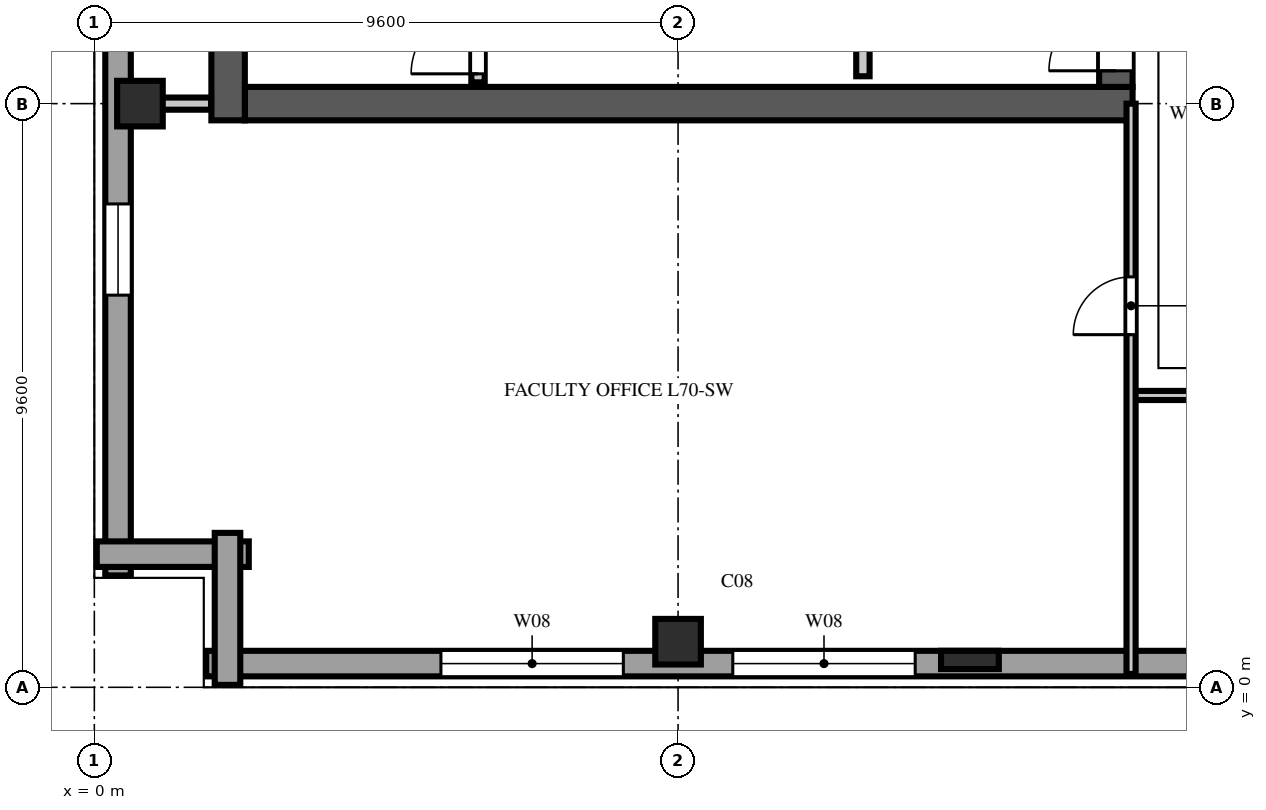
"""IFC4 building model, lengths in metres.
Left out: names, types, materials, properties, quantities, classifications, styles, units other than length and angle.
Written with IfcOpenShell. Run it as: python <this file> out.ifc"""

import sys

from ifc_helpers import new_model, si_unit, direction, frame, frame_2d, origin, origin_2d, place, context, subcontext, project, spatial, rectangle, extrude, element, fill, save


model = new_model("IFC4")
c1 = context("Model", 3, precision=1e-05, world=origin(), true_north=direction((0.0, 1.0)))
c2 = subcontext(c1, "Body", "Model", "MODEL_VIEW")
j1 = project(units=[si_unit("LENGTHUNIT", "METRE"), si_unit("PLANEANGLEUNIT", "RADIAN")], contexts=[c1])
p1 = place(None, origin())
s1 = spatial("IfcSite", under=j1, at=p1, CompositionType="ELEMENT")
p2 = place(p1, origin())
s2 = spatial("IfcBuilding", under=s1, at=p2, CompositionType="ELEMENT")
p3 = place(p2, frame((0.0, 0.0, 277.2)))
s3 = spatial("IfcBuildingStorey", under=s2, at=p3, CompositionType="ELEMENT", Elevation=277.2)
p4 = place(p3, frame((2.475, 9.6, 0.0), z_axis=(0.0, 0.0, 1.0), x_axis=(1.0, 0.0, 0.0)))
e1 = element("IfcWall", 1, at=p4, inside=s3, PredefinedType="SHEAR", context=c2, shape_type="SweptSolid", body=[
    extrude(rectangle(XDim=14.6, YDim=0.55, at=frame_2d((7.3, 0.0))), origin(), (0.0, 0.0, 1.0), 3.54),
])
p5 = place(p3, frame((2.2, 9.325, 0.0), z_axis=(0.0, 0.0, 1.0), x_axis=(0.0, 1.0, 0.0)))
e2 = element("IfcWall", 2, at=p5, inside=s3, PredefinedType="SHEAR", context=c2, shape_type="SweptSolid", body=[
    extrude(rectangle(XDim=38.95, YDim=0.55, at=frame_2d((19.475, 0.0))), origin(), (0.0, 0.0, 1.0), 3.54),
])
p6 = place(p3, frame((16.8, 9.875, 0.0), z_axis=(0.0, 0.0, 1.0), x_axis=(0.0, 1.0, 0.0)))
e3 = element("IfcWall", 3, at=p6, inside=s3, PredefinedType="SHEAR", context=c2, shape_type="SweptSolid", body=[
    extrude(rectangle(XDim=12.525, YDim=0.55, at=frame_2d((6.262, 0.0))), origin(), (0.0, 0.0, 1.0), 3.54),
])
p7 = place(p6, frame((0.265, 0.0, 0.0)))
e4 = element("IfcOpeningElement", 4, at=p7, cuts=e3, PredefinedType="OPENING", context=c2, shape_type="SweptSolid", body=[
    extrude(rectangle(XDim=1.1, YDim=2.2, at=frame_2d((0.55, 1.1))), frame((0.0, 0.287, 0.0), z_axis=(0.0, -1.0, 0.0), x_axis=(1.0, 0.0, 0.0)), (0.0, 0.0, 1.0), 0.574),
])
for number, where, z_axis, x_axis in (
    (5, (0.75, 9.6, 0.0), (0.0, 0.0, 1.0), (1.0, 0.0, 0.0)),
    (6, (9.6, 0.75, 0.0), (0.0, 0.0, 1.0), (1.0, 0.0, 0.0)),
):
    element("IfcColumn", number, at=place(p3, frame(where, z_axis=z_axis, x_axis=x_axis)), inside=s3, PredefinedType="COLUMN", context=c2, shape_type="SweptSolid", body=[
        extrude(rectangle(XDim=0.75, YDim=0.75, at=origin_2d()), origin(), (0.0, 0.0, 1.0), 3.8),
    ])
p8 = place(p3, frame((14.4, 0.45, 0.0), z_axis=(0.0, 0.0, 1.0), x_axis=(1.0, 0.0, 0.0)))
e7 = element("IfcColumn", 7, at=p8, inside=s3, PredefinedType="PILASTER", context=c2, shape_type="SweptSolid", body=[
    extrude(rectangle(XDim=0.95, YDim=0.3, at=origin_2d()), origin(), (0.0, 0.0, 1.0), 3.8),
])
p9 = place(p3, frame((1.84, 0.39, 0.0), z_axis=(0.0, 0.0, 1.0), x_axis=(1.0, 0.0, 0.0)))
e8 = element("IfcWall", 8, at=p9, inside=s3, PredefinedType="SOLIDWALL", context=c2, shape_type="SweptSolid", body=[
    extrude(rectangle(XDim=44.32, YDim=0.42, at=frame_2d((22.16, 0.0))), origin(), (0.0, 0.0, 1.0), 3.54),
])
p10 = place(p9, frame((3.86, 0.0, 0.75)))
e9 = element("IfcOpeningElement", 9, at=p10, cuts=e8, PredefinedType="OPENING", context=c2, shape_type="SweptSolid", body=[
    extrude(rectangle(XDim=3.0, YDim=1.9, at=frame_2d((1.5, 0.95))), frame((0.0, 0.222, 0.0), z_axis=(0.0, -1.0, 0.0), x_axis=(1.0, 0.0, 0.0)), (0.0, 0.0, 1.0), 0.444),
])
p11 = place(p9, frame((8.66, 0.0, 0.75)))
e10 = element("IfcOpeningElement", 10, at=p11, cuts=e8, PredefinedType="OPENING", context=c2, shape_type="SweptSolid", body=[
    extrude(rectangle(XDim=3.0, YDim=1.9, at=frame_2d((1.5, 0.95))), frame((0.0, 0.222, 0.0), z_axis=(0.0, -1.0, 0.0), x_axis=(1.0, 0.0, 0.0)), (0.0, 0.0, 1.0), 0.444),
])
p12 = place(p9, frame((18.26, 0.0, 0.75)))
e11 = element("IfcOpeningElement", 11, at=p12, cuts=e8, PredefinedType="OPENING", context=c2, shape_type="SweptSolid", body=[
    extrude(rectangle(XDim=3.0, YDim=1.9, at=frame_2d((1.5, 0.95))), frame((0.0, 0.222, 0.0), z_axis=(0.0, -1.0, 0.0), x_axis=(1.0, 0.0, 0.0)), (0.0, 0.0, 1.0), 0.444),
])
p13 = place(p3, frame((0.39, 46.16, 0.0), z_axis=(0.0, 0.0, 1.0), x_axis=(0.0, -1.0, 0.0)))
e12 = element("IfcWall", 12, at=p13, inside=s3, PredefinedType="SOLIDWALL", context=c2, shape_type="SweptSolid", body=[
    extrude(rectangle(XDim=44.32, YDim=0.42, at=frame_2d((22.16, 0.0))), origin(), (0.0, 0.0, 1.0), 3.54),
])
p14 = place(p13, frame((4.885, 0.0, 0.9)))
e13 = element("IfcOpeningElement", 13, at=p14, cuts=e12, PredefinedType="OPENING", context=c2, shape_type="SweptSolid", body=[
    extrude(rectangle(XDim=0.95, YDim=1.85, at=frame_2d((0.475, 0.925))), frame((0.0, 0.222, 0.0), z_axis=(0.0, -1.0, 0.0), x_axis=(1.0, 0.0, 0.0)), (0.0, 0.0, 1.0), 0.444),
])
p15 = place(p13, frame((9.41, 0.0, 0.9)))
e14 = element("IfcOpeningElement", 14, at=p15, cuts=e12, PredefinedType="OPENING", context=c2, shape_type="SweptSolid", body=[
    extrude(rectangle(XDim=1.5, YDim=1.85, at=frame_2d((0.75, 0.925))), frame((0.0, 0.222, 0.0), z_axis=(0.0, -1.0, 0.0), x_axis=(1.0, 0.0, 0.0)), (0.0, 0.0, 1.0), 0.444),
])
p16 = place(p13, frame((14.485, 0.0, 0.9)))
e15 = element("IfcOpeningElement", 15, at=p16, cuts=e12, PredefinedType="OPENING", context=c2, shape_type="SweptSolid", body=[
    extrude(rectangle(XDim=0.95, YDim=1.85, at=frame_2d((0.475, 0.925))), frame((0.0, 0.222, 0.0), z_axis=(0.0, -1.0, 0.0), x_axis=(1.0, 0.0, 0.0)), (0.0, 0.0, 1.0), 0.444),
])
p17 = place(p13, frame((19.01, 0.0, 0.9)))
e16 = element("IfcOpeningElement", 16, at=p17, cuts=e12, PredefinedType="OPENING", context=c2, shape_type="SweptSolid", body=[
    extrude(rectangle(XDim=1.5, YDim=1.85, at=frame_2d((0.75, 0.925))), frame((0.0, 0.222, 0.0), z_axis=(0.0, -1.0, 0.0), x_axis=(1.0, 0.0, 0.0)), (0.0, 0.0, 1.0), 0.444),
])
p18 = place(p13, frame((24.085, 0.0, 0.9)))
e17 = element("IfcOpeningElement", 17, at=p18, cuts=e12, PredefinedType="OPENING", context=c2, shape_type="SweptSolid", body=[
    extrude(rectangle(XDim=0.95, YDim=1.85, at=frame_2d((0.475, 0.925))), frame((0.0, 0.222, 0.0), z_axis=(0.0, -1.0, 0.0), x_axis=(1.0, 0.0, 0.0)), (0.0, 0.0, 1.0), 0.444),
])
p19 = place(p13, frame((28.61, 0.0, 0.9)))
e18 = element("IfcOpeningElement", 18, at=p19, cuts=e12, PredefinedType="OPENING", context=c2, shape_type="SweptSolid", body=[
    extrude(rectangle(XDim=1.5, YDim=1.85, at=frame_2d((0.75, 0.925))), frame((0.0, 0.222, 0.0), z_axis=(0.0, -1.0, 0.0), x_axis=(1.0, 0.0, 0.0)), (0.0, 0.0, 1.0), 0.444),
])
p20 = place(p13, frame((33.685, 0.0, 0.9)))
e19 = element("IfcOpeningElement", 19, at=p20, cuts=e12, PredefinedType="OPENING", context=c2, shape_type="SweptSolid", body=[
    extrude(rectangle(XDim=0.95, YDim=1.85, at=frame_2d((0.475, 0.925))), frame((0.0, 0.222, 0.0), z_axis=(0.0, -1.0, 0.0), x_axis=(1.0, 0.0, 0.0)), (0.0, 0.0, 1.0), 0.444),
])
p21 = place(p13, frame((38.21, 0.0, 0.9)))
e20 = element("IfcOpeningElement", 20, at=p21, cuts=e12, PredefinedType="OPENING", context=c2, shape_type="SweptSolid", body=[
    extrude(rectangle(XDim=1.5, YDim=1.85, at=frame_2d((0.75, 0.925))), frame((0.0, 0.222, 0.0), z_axis=(0.0, -1.0, 0.0), x_axis=(1.0, 0.0, 0.0)), (0.0, 0.0, 1.0), 0.444),
])
for number, where, z_axis, x_axis in (
    (21, (0.04, 2.19, 0.0), (0.0, 0.0, 1.0), (1.0, 0.0, 0.0)),
    (22, (2.19, 2.54, 0.0), (0.0, 0.0, 1.0), (0.0, -1.0, 0.0)),
):
    element("IfcWall", number, at=place(p3, frame(where, z_axis=z_axis, x_axis=x_axis)), inside=s3, PredefinedType="SOLIDWALL", context=c2, shape_type="SweptSolid", body=[
        extrude(rectangle(XDim=2.5, YDim=0.42, at=frame_2d((1.25, 0.0))), origin(), (0.0, 0.0, 1.0), 3.54),
    ])
p22 = place(p3, frame((6.31, 9.95, 0.0), z_axis=(0.0, 0.0, 1.0), x_axis=(0.0, 1.0, 0.0)))
e23 = element("IfcWall", 23, at=p22, inside=s3, PredefinedType="SOLIDWALL", context=c2, shape_type="SweptSolid", body=[
    extrude(rectangle(XDim=7.81, YDim=0.22, at=frame_2d((3.905, 0.0))), origin(), (0.0, 0.0, 1.0), 3.54),
])
p23 = place(p22, frame((0.14, 0.0, 0.0)))
e24 = element("IfcOpeningElement", 24, at=p23, cuts=e23, PredefinedType="OPENING", context=c2, shape_type="SweptSolid", body=[
    extrude(rectangle(XDim=1.1, YDim=2.2, at=frame_2d((0.55, 1.1))), frame((0.0, 0.122, 0.0), z_axis=(0.0, -1.0, 0.0), x_axis=(1.0, 0.0, 0.0)), (0.0, 0.0, 1.0), 0.244),
])
p24 = place(p3, frame((12.64, 10.05, 0.0), z_axis=(0.0, 0.0, 1.0), x_axis=(0.0, 1.0, 0.0)))
e25 = element("IfcWall", 25, at=p24, inside=s3, PredefinedType="SOLIDWALL", context=c2, shape_type="SweptSolid", body=[
    extrude(rectangle(XDim=7.71, YDim=0.22, at=frame_2d((3.855, 0.0))), origin(), (0.0, 0.0, 1.0), 3.54),
])
p25 = place(p3, frame((0.85, 9.6, 0.0), z_axis=(0.0, 0.0, 1.0), x_axis=(1.0, 0.0, 0.0)))
e26 = element("IfcWall", 26, at=p25, inside=s3, PredefinedType="SOLIDWALL", context=c2, shape_type="SweptSolid", body=[
    extrude(rectangle(XDim=1.07, YDim=0.2, at=frame_2d((0.535, 0.0))), origin(), (0.0, 0.0, 1.0), 2.845),
])
p26 = place(p3, frame((17.05, 4.8, 0.0), z_axis=(0.0, 0.0, 1.0), x_axis=(1.0, 0.0, 0.0)))
e27 = element("IfcWall", 27, at=p26, inside=s3, PredefinedType="PARTITIONING", context=c2, shape_type="SweptSolid", body=[
    extrude(rectangle(XDim=2.15, YDim=0.15, at=frame_2d((1.075, 0.0))), origin(), (0.0, 0.0, 1.0), 3.54),
])
p27 = place(p3, frame((17.05, 0.22, 0.0), z_axis=(0.0, 0.0, 1.0), x_axis=(0.0, 1.0, 0.0)))
e28 = element("IfcWall", 28, at=p27, inside=s3, PredefinedType="PARTITIONING", context=c2, shape_type="SweptSolid", body=[
    extrude(rectangle(XDim=9.38, YDim=0.15, at=frame_2d((4.69, 0.0))), origin(), (0.0, 0.0, 1.0), 3.54),
])
p28 = place(p27, frame((5.58, 0.0, 0.0)))
e29 = element("IfcOpeningElement", 29, at=p28, cuts=e28, PredefinedType="OPENING", context=c2, shape_type="SweptSolid", body=[
    extrude(rectangle(XDim=0.95, YDim=2.15, at=frame_2d((0.475, 1.075))), frame((0.0, 0.087, 0.0), z_axis=(0.0, -1.0, 0.0), x_axis=(1.0, 0.0, 0.0)), (0.0, 0.0, 1.0), 0.174),
])
p29 = place(p10, origin())
e30 = element("IfcWindow", 30, at=p29, inside=s3, PartitioningType="TRIPLE_PANEL_VERTICAL", PredefinedType="WINDOW", context=c2, shape_type="SweptSolid", body=[
    extrude(rectangle(XDim=3.0, YDim=1.9, at=frame_2d((1.5, 0.95))), frame((0.0, 0.11, 0.0), z_axis=(0.0, -1.0, 0.0), x_axis=(1.0, 0.0, 0.0)), (0.0, 0.0, 1.0), 0.06),
])
fill(e9, e30)
p30 = place(p11, origin())
e31 = element("IfcWindow", 31, at=p30, inside=s3, PartitioningType="TRIPLE_PANEL_VERTICAL", PredefinedType="WINDOW", context=c2, shape_type="SweptSolid", body=[
    extrude(rectangle(XDim=3.0, YDim=1.9, at=frame_2d((1.5, 0.95))), frame((0.0, 0.11, 0.0), z_axis=(0.0, -1.0, 0.0), x_axis=(1.0, 0.0, 0.0)), (0.0, 0.0, 1.0), 0.06),
])
fill(e10, e31)
p31 = place(p21, origin())
e32 = element("IfcWindow", 32, at=p31, inside=s3, PartitioningType="DOUBLE_PANEL_VERTICAL", PredefinedType="WINDOW", context=c2, shape_type="SweptSolid", body=[
    extrude(rectangle(XDim=1.5, YDim=1.85, at=frame_2d((0.75, 0.925))), frame((0.0, 0.11, 0.0), z_axis=(0.0, -1.0, 0.0), x_axis=(1.0, 0.0, 0.0)), (0.0, 0.0, 1.0), 0.06),
])
fill(e20, e32)
p32 = place(p23, origin())
e33 = element("IfcDoor", 33, at=p32, inside=s3, OperationType="SINGLE_SWING_LEFT", PredefinedType="DOOR", context=c2, shape_type="SweptSolid", body=[
    extrude(rectangle(XDim=1.1, YDim=2.2, at=frame_2d((0.55, 1.1))), frame((0.0, 0.025, 0.0), z_axis=(0.0, -1.0, 0.0), x_axis=(1.0, 0.0, 0.0)), (0.0, 0.0, 1.0), 0.05),
])
fill(e24, e33)
p33 = place(p7, origin())
e34 = element("IfcDoor", 34, at=p33, inside=s3, OperationType="SINGLE_SWING_LEFT", PredefinedType="DOOR", context=c2, shape_type="SweptSolid", body=[
    extrude(rectangle(XDim=1.1, YDim=2.2, at=frame_2d((0.55, 1.1))), frame((0.0, 0.025, 0.0), z_axis=(0.0, -1.0, 0.0), x_axis=(1.0, 0.0, 0.0)), (0.0, 0.0, 1.0), 0.05),
])
fill(e4, e34)
p34 = place(p28, origin())
e35 = element("IfcDoor", 35, at=p34, inside=s3, OperationType="SINGLE_SWING_LEFT", PredefinedType="DOOR", context=c2, shape_type="SweptSolid", body=[
    extrude(rectangle(XDim=0.95, YDim=2.15, at=frame_2d((0.475, 1.075))), frame((0.0, 0.025, 0.0), z_axis=(0.0, -1.0, 0.0), x_axis=(1.0, 0.0, 0.0)), (0.0, 0.0, 1.0), 0.05),
])
fill(e29, e35)
save(model, sys.argv[1])
